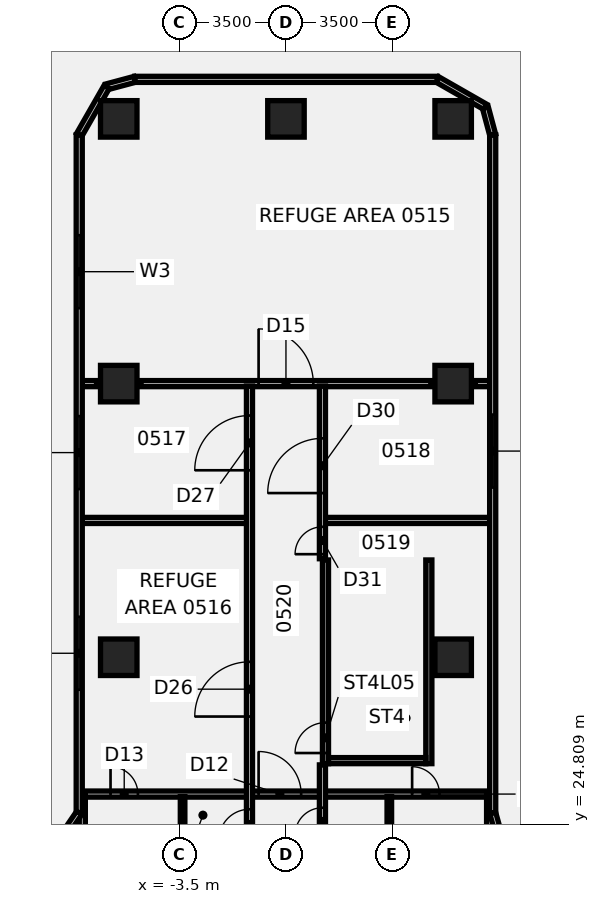
"""IFC4 building model, lengths in metres.
Left out: names, types, materials, properties, quantities, classifications, styles, units other than length and angle.
Written with IfcOpenShell. Run it as: python <this file> out.ifc"""

import sys

from ifc_helpers import new_model, si_unit, direction, frame, frame_2d, origin, origin_2d, place, context, subcontext, project, spatial, polyline, rectangle, outline, extrude, element, fill, save


model = new_model("IFC4")
c1 = context("Model", 3, precision=1e-05, world=origin(), true_north=direction((0.0, 1.0)))
c2 = subcontext(c1, "Body", "Model", "MODEL_VIEW")
j1 = project(units=[si_unit("LENGTHUNIT", "METRE"), si_unit("PLANEANGLEUNIT", "RADIAN")], contexts=[c1])
p1 = place(None, origin())
s1 = spatial("IfcSite", under=j1, at=p1, CompositionType="ELEMENT")
p2 = place(p1, origin())
s2 = spatial("IfcBuilding", under=s1, at=p2, CompositionType="ELEMENT")
p3 = place(p2, frame((0.0, 0.0, 29.5)))
s3 = spatial("IfcBuildingStorey", under=s2, at=p3, CompositionType="ELEMENT", Elevation=29.5)
p4 = place(p3, frame((-5.5, 39.3, -0.6), z_axis=(0.0, 0.0, 1.0), x_axis=(1.0, 0.0, 0.0)))
e1 = element("IfcColumn", 1, at=p4, inside=s3, PredefinedType="COLUMN", context=c2, shape_type="SweptSolid", body=[
    extrude(rectangle(XDim=1.2, YDim=1.2, at=origin_2d()), origin(), (0.0, 0.0, 1.0), 4.926),
])
p5 = place(p3, frame((5.5, 39.3, -0.6), z_axis=(0.0, 0.0, 1.0), x_axis=(1.0, 0.0, 0.0)))
e2 = element("IfcColumn", 2, at=p5, inside=s3, PredefinedType="COLUMN", context=c2, shape_type="SweptSolid", body=[
    extrude(rectangle(XDim=1.2, YDim=1.2, at=origin_2d()), origin(), (0.0, 0.0, 1.0), 4.926),
])
for number, where, z_axis, x_axis in (
    (3, (-5.5, 30.3, -0.6), (0.0, 0.0, 1.0), (1.0, 0.0, 0.0)),
    (4, (5.5, 30.3, -0.6), (0.0, 0.0, 1.0), (1.0, 0.0, 0.0)),
):
    element("IfcColumn", number, at=place(p3, frame(where, z_axis=z_axis, x_axis=x_axis)), inside=s3, PredefinedType="COLUMN", context=c2, shape_type="SweptSolid", body=[
        extrude(rectangle(XDim=1.2, YDim=1.2, at=origin_2d()), origin(), (0.0, 0.0, 1.0), 4.939),
    ])
p6 = place(p3, frame((5.5, 48.008, -0.6), z_axis=(0.0, 0.0, 1.0), x_axis=(1.0, 0.0, 0.0)))
e5 = element("IfcColumn", 5, at=p6, inside=s3, PredefinedType="COLUMN", context=c2, shape_type="SweptSolid", body=[
    extrude(rectangle(XDim=1.2, YDim=1.2, at=origin_2d()), origin(), (0.0, 0.0, 1.0), 4.918),
])
p7 = place(p3, frame((0.0, 48.008, -0.6), z_axis=(0.0, 0.0, 1.0), x_axis=(1.0, 0.0, 0.0)))
e6 = element("IfcColumn", 6, at=p7, inside=s3, PredefinedType="COLUMN", context=c2, shape_type="SweptSolid", body=[
    extrude(rectangle(XDim=1.2, YDim=1.2, at=origin_2d()), origin(), (0.0, 0.0, 1.0), 4.917),
])
p8 = place(p3, frame((-5.5, 48.008, -0.6), z_axis=(0.0, 0.0, 1.0), x_axis=(1.0, 0.0, 0.0)))
e7 = element("IfcColumn", 7, at=p8, inside=s3, PredefinedType="COLUMN", context=c2, shape_type="SweptSolid", body=[
    extrude(rectangle(XDim=1.2, YDim=1.2, at=origin_2d()), origin(), (0.0, 0.0, 1.0), 4.909),
])
p9 = place(p3, frame((-6.619, 25.8, 0.0), z_axis=(0.0, 0.0, 1.0), x_axis=(1.0, 0.0, 0.0)))
e8 = element("IfcWall", 8, at=p9, inside=s3, PredefinedType="PARTITIONING", context=c2, shape_type="SweptSolid", body=[
    extrude(rectangle(XDim=13.238, YDim=0.2, at=frame_2d((6.619, 0.0))), origin(), (0.0, 0.0, 1.0), 3.76),
])
p10 = place(p9, frame((5.719, 0.0, 0.0)))
e9 = element("IfcOpeningElement", 9, at=p10, cuts=e8, PredefinedType="OPENING", context=c2, shape_type="SweptSolid", body=[
    extrude(rectangle(XDim=1.4, YDim=2.1, at=frame_2d((0.7, 1.05))), frame((0.0, 0.11, 0.0), z_axis=(0.0, -1.0, 0.0), x_axis=(1.0, 0.0, 0.0)), (0.0, 0.0, 1.0), 0.22),
])
p11 = place(p9, frame((0.849, 0.0, 0.0)))
e10 = element("IfcOpeningElement", 10, at=p11, cuts=e8, PredefinedType="OPENING", context=c2, shape_type="SweptSolid", body=[
    extrude(rectangle(XDim=0.9, YDim=2.1, at=frame_2d((0.45, 1.05))), frame((0.0, 0.11, 0.0), z_axis=(0.0, -1.0, 0.0), x_axis=(1.0, 0.0, 0.0)), (0.0, 0.0, 1.0), 0.22),
])
p12 = place(p9, frame((10.769, 0.0, 0.0)))
e11 = element("IfcOpeningElement", 11, at=p12, cuts=e8, PredefinedType="OPENING", context=c2, shape_type="SweptSolid", body=[
    extrude(rectangle(XDim=0.9, YDim=2.1, at=frame_2d((0.45, 1.05))), frame((0.0, 0.11, 0.0), z_axis=(0.0, -1.0, 0.0), x_axis=(1.0, 0.0, 0.0)), (0.0, 0.0, 1.0), 0.22),
])
for number, where, z_axis, x_axis in (
    (12, (-6.699, 34.8, 0.0), (0.0, 0.0, 1.0), (1.0, 0.0, 0.0)),
    (13, (1.285, 34.8, 0.0), (0.0, 0.0, 1.0), (1.0, 0.0, 0.0)),
):
    element("IfcWall", number, at=place(p3, frame(where, z_axis=z_axis, x_axis=x_axis)), inside=s3, PredefinedType="PARTITIONING", context=c2, shape_type="SweptSolid", body=[
        extrude(rectangle(XDim=5.414, YDim=0.2, at=frame_2d((2.707, 0.0))), origin(), (0.0, 0.0, 1.0), 3.76),
    ])
p13 = place(p3, frame((-6.699, 39.3, 0.0), z_axis=(0.0, 0.0, 1.0), x_axis=(1.0, 0.0, 0.0)))
e14 = element("IfcWall", 14, at=p13, inside=s3, PredefinedType="PARTITIONING", context=c2, shape_type="SweptSolid", body=[
    extrude(rectangle(XDim=0.469, YDim=0.2, at=frame_2d((0.234, 0.0))), origin(), (0.0, 0.0, 1.0), 3.76),
])
p14 = place(p3, frame((-4.77, 39.3, 0.0), z_axis=(0.0, 0.0, 1.0), x_axis=(1.0, 0.0, 0.0)))
e15 = element("IfcWall", 15, at=p14, inside=s3, PredefinedType="PARTITIONING", context=c2, shape_type="SweptSolid", body=[
    extrude(rectangle(XDim=9.54, YDim=0.2, at=frame_2d((4.77, 0.0))), origin(), (0.0, 0.0, 1.0), 3.76),
])
p15 = place(p14, frame((3.87, 0.0, 0.0)))
e16 = element("IfcOpeningElement", 16, at=p15, cuts=e15, PredefinedType="OPENING", context=c2, shape_type="SweptSolid", body=[
    extrude(rectangle(XDim=1.8, YDim=2.1, at=frame_2d((0.9, 1.05))), frame((0.0, 0.11, 0.0), z_axis=(0.0, -1.0, 0.0), x_axis=(1.0, 0.0, 0.0)), (0.0, 0.0, 1.0), 0.22),
])
p16 = place(p3, frame((6.23, 39.3, 0.0), z_axis=(0.0, 0.0, 1.0), x_axis=(1.0, 0.0, 0.0)))
e17 = element("IfcWall", 17, at=p16, inside=s3, PredefinedType="PARTITIONING", context=c2, shape_type="SweptSolid", body=[
    extrude(rectangle(XDim=0.469, YDim=0.2, at=frame_2d((0.234, 0.0))), origin(), (0.0, 0.0, 1.0), 3.76),
])
p17 = place(p3, frame((-3.4, 22.711, 0.0), z_axis=(0.0, 0.0, 1.0), x_axis=(0.0, 1.0, 0.0)))
e18 = element("IfcWall", 18, at=p17, inside=s3, PredefinedType="PARTITIONING", context=c2, shape_type="SweptSolid", body=[
    extrude(rectangle(XDim=3.004, YDim=0.15, at=frame_2d((1.502, 0.0))), origin(), (0.0, 0.0, 1.0), 3.76),
])
p18 = place(p3, frame((-1.2, 23.4, 0.0), z_axis=(0.0, 0.0, 1.0), x_axis=(0.0, 1.0, 0.0)))
e19 = element("IfcWall", 19, at=p18, inside=s3, PredefinedType="PARTITIONING", context=c2, shape_type="SweptSolid", body=[
    extrude(rectangle(XDim=15.82, YDim=0.2, at=frame_2d((7.91, 0.0))), origin(), (0.0, 0.0, 1.0), 3.76),
])
p19 = place(p18, frame((0.9, 0.0, 0.0)))
e20 = element("IfcOpeningElement", 20, at=p19, cuts=e19, PredefinedType="OPENING", context=c2, shape_type="SweptSolid", body=[
    extrude(rectangle(XDim=1.0, YDim=2.1, at=frame_2d((0.5, 1.05))), frame((0.0, 0.11, 0.0), z_axis=(0.0, -1.0, 0.0), x_axis=(1.0, 0.0, 0.0)), (0.0, 0.0, 1.0), 0.22),
])
p20 = place(p18, frame((4.95, 0.0, 0.0)))
e21 = element("IfcOpeningElement", 21, at=p20, cuts=e19, PredefinedType="OPENING", context=c2, shape_type="SweptSolid", body=[
    extrude(rectangle(XDim=1.8, YDim=2.1, at=frame_2d((0.9, 1.05))), frame((0.0, 0.11, 0.0), z_axis=(0.0, -1.0, 0.0), x_axis=(1.0, 0.0, 0.0)), (0.0, 0.0, 1.0), 0.22),
])
p21 = place(p18, frame((13.05, 0.0, 0.0)))
e22 = element("IfcOpeningElement", 22, at=p21, cuts=e19, PredefinedType="OPENING", context=c2, shape_type="SweptSolid", body=[
    extrude(rectangle(XDim=1.8, YDim=2.1, at=frame_2d((0.9, 1.05))), frame((0.0, 0.11, 0.0), z_axis=(0.0, -1.0, 0.0), x_axis=(1.0, 0.0, 0.0)), (0.0, 0.0, 1.0), 0.22),
])
p22 = place(p3, frame((1.2, 23.4, 0.0), z_axis=(0.0, 0.0, 1.0), x_axis=(0.0, 1.0, 0.0)))
e23 = element("IfcWall", 23, at=p22, inside=s3, PredefinedType="PARTITIONING", context=c2, shape_type="SweptSolid", body=[
    extrude(rectangle(XDim=3.36, YDim=0.2, at=frame_2d((1.68, 0.0))), origin(), (0.0, 0.0, 1.0), 3.76),
])
p23 = place(p22, frame((1.05, 0.0, 0.0)))
e24 = element("IfcOpeningElement", 24, at=p23, cuts=e23, PredefinedType="OPENING", context=c2, shape_type="SweptSolid", body=[
    extrude(rectangle(XDim=0.9, YDim=2.1, at=frame_2d((0.45, 1.05))), frame((0.0, 0.11, 0.0), z_axis=(0.0, -1.0, 0.0), x_axis=(1.0, 0.0, 0.0)), (0.0, 0.0, 1.0), 0.22),
])
p24 = place(p3, frame((1.2, 33.54, 0.0), z_axis=(0.0, 0.0, 1.0), x_axis=(0.0, 1.0, 0.0)))
e25 = element("IfcWall", 25, at=p24, inside=s3, PredefinedType="PARTITIONING", context=c2, shape_type="SweptSolid", body=[
    extrude(rectangle(XDim=5.68, YDim=0.2, at=frame_2d((2.84, 0.0))), origin(), (0.0, 0.0, 1.0), 3.76),
])
p25 = place(p24, frame((2.16, 0.0, 0.0)))
e26 = element("IfcOpeningElement", 26, at=p25, cuts=e25, PredefinedType="OPENING", context=c2, shape_type="SweptSolid", body=[
    extrude(rectangle(XDim=1.8, YDim=2.1, at=frame_2d((0.9, 1.05))), frame((0.0, 0.11, 0.0), z_axis=(0.0, -1.0, 0.0), x_axis=(1.0, 0.0, 0.0)), (0.0, 0.0, 1.0), 0.22),
])
p26 = place(p24, frame((0.15, 0.0, 0.0)))
e27 = element("IfcOpeningElement", 27, at=p26, cuts=e25, PredefinedType="OPENING", context=c2, shape_type="SweptSolid", body=[
    extrude(rectangle(XDim=0.9, YDim=2.1, at=frame_2d((0.45, 1.05))), frame((0.0, 0.11, 0.0), z_axis=(0.0, -1.0, 0.0), x_axis=(1.0, 0.0, 0.0)), (0.0, 0.0, 1.0), 0.22),
])
p27 = place(p3, frame((3.4, 22.711, 0.0), z_axis=(0.0, 0.0, 1.0), x_axis=(0.0, 1.0, 0.0)))
e28 = element("IfcWall", 28, at=p27, inside=s3, PredefinedType="PARTITIONING", context=c2, shape_type="SweptSolid", body=[
    extrude(rectangle(XDim=3.004, YDim=0.15, at=frame_2d((1.502, 0.0))), origin(), (0.0, 0.0, 1.0), 3.76),
])
for number, where, z_axis, x_axis in (
    (29, (-6.699, 25.8, 0.0), (0.0, 0.0, 1.0), (0.0, -1.0, 0.0)),
    (30, (6.699, 25.8, 0.0), (0.0, 0.0, 1.0), (0.0, -1.0, 0.0)),
):
    element("IfcWall", number, at=place(p3, frame(where, z_axis=z_axis, x_axis=x_axis)), inside=s3, PredefinedType="PARTITIONING", context=c2, shape_type="SweptSolid", body=[
        extrude(rectangle(XDim=3.42, YDim=0.2, at=frame_2d((1.71, 0.0))), origin(), (0.0, 0.0, 1.0), 3.76),
    ])
p28 = place(p3, frame((7.25, 23.569, 0.0), z_axis=(0.0, 0.0, 1.0), x_axis=(-0.268802114608, 0.963195423153, 0.0)))
e31 = element("IfcWall", 31, at=p28, inside=s3, PredefinedType="SOLIDWALL", context=c2, shape_type="SweptSolid", body=[
    extrude(rectangle(XDim=1.674, YDim=0.2, at=frame_2d((0.837, 0.0))), origin(), (0.0, 0.0, 1.0), 4.36),
])
p29 = place(p3, frame((6.8, 25.181, 0.0), z_axis=(0.0, 0.0, 1.0), x_axis=(0.0, 1.0, 0.0)))
e32 = element("IfcWall", 32, at=p29, inside=s3, PredefinedType="SOLIDWALL", context=c2, shape_type="SweptSolid", body=[
    extrude(rectangle(XDim=22.3, YDim=0.2, at=frame_2d((11.15, 0.0))), origin(), (0.0, 0.0, 1.0), 4.36),
])
p30 = place(p29, frame((10.7, 0.0, 1.4)))
e33 = element("IfcOpeningElement", 33, at=p30, cuts=e32, PredefinedType="OPENING", context=c2, shape_type="SweptSolid", body=[
    extrude(rectangle(XDim=2.4, YDim=2.1, at=frame_2d((1.2, 1.05))), frame((0.0, 0.11, 0.0), z_axis=(0.0, -1.0, 0.0), x_axis=(1.0, 0.0, 0.0)), (0.0, 0.0, 1.0), 0.22),
])
p31 = place(p3, frame((6.8, 47.481, 0.0), z_axis=(0.0, 0.0, 1.0), x_axis=(-0.258855296676, 0.96591611198, 0.0)))
e34 = element("IfcWall", 34, at=p31, inside=s3, PredefinedType="SOLIDWALL", context=c2, shape_type="SweptSolid", body=[
    extrude(rectangle(XDim=0.955, YDim=0.2, at=frame_2d((0.478, 0.0))), origin(), (0.0, 0.0, 1.0), 4.36),
])
p32 = place(p3, frame((6.553, 48.404, 0.0), z_axis=(0.0, 0.0, 1.0), x_axis=(-0.867953965836, 0.496644654848, 0.0)))
e35 = element("IfcWall", 35, at=p32, inside=s3, PredefinedType="SOLIDWALL", context=c2, shape_type="SweptSolid", body=[
    extrude(rectangle(XDim=1.819, YDim=0.2, at=frame_2d((0.91, 0.0))), origin(), (0.0, 0.0, 1.0), 4.36),
])
p33 = place(p3, frame((4.974, 49.308, 0.0), z_axis=(0.0, 0.0, 1.0), x_axis=(-1.0, 0.0, 0.0)))
e36 = element("IfcWall", 36, at=p33, inside=s3, PredefinedType="SOLIDWALL", context=c2, shape_type="SweptSolid", body=[
    extrude(rectangle(XDim=9.947, YDim=0.2, at=frame_2d((4.974, 0.0))), origin(), (0.0, 0.0, 1.0), 4.36),
])
p34 = place(p3, frame((-4.974, 49.308, 0.0), z_axis=(0.0, 0.0, 1.0), x_axis=(-0.96591611198, -0.258855296676, 0.0)))
e37 = element("IfcWall", 37, at=p34, inside=s3, PredefinedType="SOLIDWALL", context=c2, shape_type="SweptSolid", body=[
    extrude(rectangle(XDim=0.955, YDim=0.2, at=frame_2d((0.478, 0.0))), origin(), (0.0, 0.0, 1.0), 4.36),
])
p35 = place(p3, frame((-5.896, 49.06, 0.0), z_axis=(0.0, 0.0, 1.0), x_axis=(-0.496644654848, -0.867953965836, 0.0)))
e38 = element("IfcWall", 38, at=p35, inside=s3, PredefinedType="SOLIDWALL", context=c2, shape_type="SweptSolid", body=[
    extrude(rectangle(XDim=1.819, YDim=0.2, at=frame_2d((0.91, 0.0))), origin(), (0.0, 0.0, 1.0), 4.36),
])
p36 = place(p3, frame((-6.8, 47.481, 0.0), z_axis=(0.0, 0.0, 1.0), x_axis=(0.0, -1.0, 0.0)))
e39 = element("IfcWall", 39, at=p36, inside=s3, PredefinedType="SOLIDWALL", context=c2, shape_type="SweptSolid", body=[
    extrude(rectangle(XDim=22.3, YDim=0.2, at=frame_2d((11.15, 0.0))), origin(), (0.0, 0.0, 1.0), 4.36),
])
p37 = place(p36, frame((3.3, 0.0, 1.4)))
e40 = element("IfcOpeningElement", 40, at=p37, cuts=e39, PredefinedType="OPENING", context=c2, shape_type="SweptSolid", body=[
    extrude(rectangle(XDim=2.4, YDim=2.1, at=frame_2d((1.2, 1.05))), frame((0.0, 0.11, 0.0), z_axis=(0.0, -1.0, 0.0), x_axis=(1.0, 0.0, 0.0)), (0.0, 0.0, 1.0), 0.22),
])
p38 = place(p36, frame((15.85, 0.0, 1.4)))
e41 = element("IfcOpeningElement", 41, at=p38, cuts=e39, PredefinedType="OPENING", context=c2, shape_type="SweptSolid", body=[
    extrude(rectangle(XDim=2.4, YDim=2.1, at=frame_2d((1.2, 1.05))), frame((0.0, 0.11, 0.0), z_axis=(0.0, -1.0, 0.0), x_axis=(1.0, 0.0, 0.0)), (0.0, 0.0, 1.0), 0.22),
])
p39 = place(p36, frame((9.25, 0.0, 1.4)))
e42 = element("IfcOpeningElement", 42, at=p39, cuts=e39, PredefinedType="OPENING", context=c2, shape_type="SweptSolid", body=[
    extrude(rectangle(XDim=2.4, YDim=2.1, at=frame_2d((1.2, 1.05))), frame((0.0, 0.11, 0.0), z_axis=(0.0, -1.0, 0.0), x_axis=(1.0, 0.0, 0.0)), (0.0, 0.0, 1.0), 0.22),
])
p40 = place(p3, frame((-6.8, 25.181, 0.0), z_axis=(0.0, 0.0, 1.0), x_axis=(-0.564050059702, -0.825740594951, 0.0)))
e43 = element("IfcWall", 43, at=p40, inside=s3, PredefinedType="SOLIDWALL", context=c2, shape_type="SweptSolid", body=[
    extrude(rectangle(XDim=3.812, YDim=0.2, at=frame_2d((1.906, 0.0))), origin(), (0.0, 0.0, 1.0), 4.36),
])
p41 = place(p3, frame((1.3, 26.8, 0.0), z_axis=(0.0, 0.0, 1.0), x_axis=(0.0, 1.0, 0.0)))
e44 = element("IfcWall", 44, at=p41, inside=s3, PredefinedType="SHEAR", context=c2, shape_type="SweptSolid", body=[
    extrude(rectangle(XDim=6.7, YDim=0.2, at=frame_2d((3.35, 0.0))), origin(), (0.0, 0.0, 1.0), 3.76),
])
p42 = place(p41, frame((0.35, 0.0, 0.0)))
e45 = element("IfcOpeningElement", 45, at=p42, cuts=e44, PredefinedType="OPENING", context=c2, shape_type="SweptSolid", body=[
    extrude(rectangle(XDim=1.0, YDim=2.1, at=frame_2d((0.5, 1.05))), frame((0.0, 0.11, 0.0), z_axis=(0.0, -1.0, 0.0), x_axis=(1.0, 0.0, 0.0)), (0.0, 0.0, 1.0), 0.22),
])
p43 = place(p3, frame((4.7, 26.8, 0.0), z_axis=(0.0, 0.0, 1.0), x_axis=(0.0, 1.0, 0.0)))
e46 = element("IfcWall", 46, at=p43, inside=s3, PredefinedType="SHEAR", context=c2, shape_type="SweptSolid", body=[
    extrude(rectangle(XDim=6.7, YDim=0.2, at=frame_2d((3.35, 0.0))), origin(), (0.0, 0.0, 1.0), 3.76),
])
p44 = place(p3, frame((4.6, 26.9, 0.0), z_axis=(0.0, 0.0, 1.0), x_axis=(-1.0, 0.0, 0.0)))
e47 = element("IfcWall", 47, at=p44, inside=s3, PredefinedType="SHEAR", context=c2, shape_type="SweptSolid", body=[
    extrude(rectangle(XDim=3.2, YDim=0.2, at=frame_2d((1.6, 0.0))), origin(), (0.0, 0.0, 1.0), 3.76),
])
p45 = place(p3, origin())
e48 = element("IfcWall", 48, at=p45, inside=s3, PredefinedType="SHEAR", context=c2, shape_type="SweptSolid", body=[
    extrude(outline(polyline([(4.6, 33.3), (4.6, 33.5), (1.4, 33.5), (1.4, 33.3), (4.6, 33.3)])), origin(), (0.0, 0.0, 1.0), 3.76),
])
p46 = place(p10, frame((1.4, 0.0, 0.0), z_axis=(0.0, 0.0, 1.0), x_axis=(-1.0, 0.0, 0.0)))
e49 = element("IfcDoor", 49, at=p46, inside=s3, OperationType="DOUBLE_DOOR_SINGLE_SWING", PredefinedType="DOOR", context=c2, shape_type="SweptSolid", body=[
    extrude(rectangle(XDim=1.4, YDim=2.1, at=frame_2d((0.7, 1.05))), frame((0.0, 0.025, 0.0), z_axis=(0.0, -1.0, 0.0), x_axis=(1.0, 0.0, 0.0)), (0.0, 0.0, 1.0), 0.05),
])
fill(e9, e49)
p47 = place(p11, frame((0.9, 0.0, 0.0), z_axis=(0.0, 0.0, 1.0), x_axis=(-1.0, 0.0, 0.0)))
e50 = element("IfcDoor", 50, at=p47, inside=s3, OperationType="SINGLE_SWING_LEFT", PredefinedType="DOOR", context=c2, shape_type="SweptSolid", body=[
    extrude(rectangle(XDim=0.9, YDim=2.1, at=frame_2d((0.45, 1.05))), frame((0.0, 0.025, 0.0), z_axis=(0.0, -1.0, 0.0), x_axis=(1.0, 0.0, 0.0)), (0.0, 0.0, 1.0), 0.05),
])
fill(e10, e50)
p48 = place(p12, frame((0.9, 0.0, 0.0), z_axis=(0.0, 0.0, 1.0), x_axis=(-1.0, 0.0, 0.0)))
e51 = element("IfcDoor", 51, at=p48, inside=s3, OperationType="SINGLE_SWING_RIGHT", PredefinedType="DOOR", context=c2, shape_type="SweptSolid", body=[
    extrude(rectangle(XDim=0.9, YDim=2.1, at=frame_2d((0.45, 1.05))), frame((0.0, 0.025, 0.0), z_axis=(0.0, -1.0, 0.0), x_axis=(1.0, 0.0, 0.0)), (0.0, 0.0, 1.0), 0.05),
])
fill(e11, e51)
p49 = place(p15, origin())
e52 = element("IfcDoor", 52, at=p49, inside=s3, OperationType="DOUBLE_DOOR_SINGLE_SWING", PredefinedType="DOOR", context=c2, shape_type="SweptSolid", body=[
    extrude(rectangle(XDim=1.8, YDim=2.1, at=frame_2d((0.9, 1.05))), frame((0.0, 0.025, 0.0), z_axis=(0.0, -1.0, 0.0), x_axis=(1.0, 0.0, 0.0)), (0.0, 0.0, 1.0), 0.05),
])
fill(e16, e52)
p50 = place(p19, origin())
e53 = element("IfcDoor", 53, at=p50, inside=s3, OperationType="SINGLE_SWING_RIGHT", PredefinedType="DOOR", context=c2, shape_type="SweptSolid", body=[
    extrude(rectangle(XDim=1.0, YDim=2.1, at=frame_2d((0.5, 1.05))), frame((0.0, 0.025, 0.0), z_axis=(0.0, -1.0, 0.0), x_axis=(1.0, 0.0, 0.0)), (0.0, 0.0, 1.0), 0.05),
])
fill(e20, e53)
p51 = place(p20, origin())
e54 = element("IfcDoor", 54, at=p51, inside=s3, OperationType="DOUBLE_DOOR_SINGLE_SWING", PredefinedType="DOOR", context=c2, shape_type="SweptSolid", body=[
    extrude(rectangle(XDim=1.8, YDim=2.1, at=frame_2d((0.9, 1.05))), frame((0.0, 0.025, 0.0), z_axis=(0.0, -1.0, 0.0), x_axis=(1.0, 0.0, 0.0)), (0.0, 0.0, 1.0), 0.05),
])
fill(e21, e54)
p52 = place(p21, origin())
e55 = element("IfcDoor", 55, at=p52, inside=s3, OperationType="DOUBLE_DOOR_SINGLE_SWING", PredefinedType="DOOR", context=c2, shape_type="SweptSolid", body=[
    extrude(rectangle(XDim=1.8, YDim=2.1, at=frame_2d((0.9, 1.05))), frame((0.0, 0.025, 0.0), z_axis=(0.0, -1.0, 0.0), x_axis=(1.0, 0.0, 0.0)), (0.0, 0.0, 1.0), 0.05),
])
fill(e22, e55)
p53 = place(p23, frame((0.9, 0.0, 0.0), z_axis=(0.0, 0.0, 1.0), x_axis=(-1.0, 0.0, 0.0)))
e56 = element("IfcDoor", 56, at=p53, inside=s3, OperationType="SINGLE_SWING_LEFT", PredefinedType="DOOR", context=c2, shape_type="SweptSolid", body=[
    extrude(rectangle(XDim=0.9, YDim=2.1, at=frame_2d((0.45, 1.05))), frame((0.0, 0.025, 0.0), z_axis=(0.0, -1.0, 0.0), x_axis=(1.0, 0.0, 0.0)), (0.0, 0.0, 1.0), 0.05),
])
fill(e24, e56)
p54 = place(p25, frame((1.8, 0.0, 0.0), z_axis=(0.0, 0.0, 1.0), x_axis=(-1.0, 0.0, 0.0)))
e57 = element("IfcDoor", 57, at=p54, inside=s3, OperationType="DOUBLE_DOOR_SINGLE_SWING", PredefinedType="DOOR", context=c2, shape_type="SweptSolid", body=[
    extrude(rectangle(XDim=1.8, YDim=2.1, at=frame_2d((0.9, 1.05))), frame((0.0, 0.025, 0.0), z_axis=(0.0, -1.0, 0.0), x_axis=(1.0, 0.0, 0.0)), (0.0, 0.0, 1.0), 0.05),
])
fill(e26, e57)
p55 = place(p26, frame((0.9, 0.0, 0.0), z_axis=(0.0, 0.0, 1.0), x_axis=(-1.0, 0.0, 0.0)))
e58 = element("IfcDoor", 58, at=p55, inside=s3, OperationType="SINGLE_SWING_LEFT", PredefinedType="DOOR", context=c2, shape_type="SweptSolid", body=[
    extrude(rectangle(XDim=0.9, YDim=2.1, at=frame_2d((0.45, 1.05))), frame((0.0, 0.025, 0.0), z_axis=(0.0, -1.0, 0.0), x_axis=(1.0, 0.0, 0.0)), (0.0, 0.0, 1.0), 0.05),
])
fill(e27, e58)
p56 = place(p37, origin())
e59 = element("IfcWindow", 59, at=p56, inside=s3, PartitioningType="SINGLE_PANEL", PredefinedType="WINDOW", context=c2, shape_type="SweptSolid", body=[
    extrude(rectangle(XDim=2.4, YDim=2.1, at=frame_2d((1.2, 1.05))), frame((0.0, 0.03, 0.0), z_axis=(0.0, -1.0, 0.0), x_axis=(1.0, 0.0, 0.0)), (0.0, 0.0, 1.0), 0.06),
])
fill(e40, e59)
p57 = place(p38, origin())
e60 = element("IfcWindow", 60, at=p57, inside=s3, PartitioningType="SINGLE_PANEL", PredefinedType="WINDOW", context=c2, shape_type="SweptSolid", body=[
    extrude(rectangle(XDim=2.4, YDim=2.1, at=frame_2d((1.2, 1.05))), frame((0.0, 0.03, 0.0), z_axis=(0.0, -1.0, 0.0), x_axis=(1.0, 0.0, 0.0)), (0.0, 0.0, 1.0), 0.06),
])
fill(e41, e60)
p58 = place(p39, origin())
e61 = element("IfcWindow", 61, at=p58, inside=s3, PartitioningType="SINGLE_PANEL", PredefinedType="WINDOW", context=c2, shape_type="SweptSolid", body=[
    extrude(rectangle(XDim=2.4, YDim=2.1, at=frame_2d((1.2, 1.05))), frame((0.0, 0.03, 0.0), z_axis=(0.0, -1.0, 0.0), x_axis=(1.0, 0.0, 0.0)), (0.0, 0.0, 1.0), 0.06),
])
fill(e42, e61)
p59 = place(p30, origin())
e62 = element("IfcWindow", 62, at=p59, inside=s3, PartitioningType="SINGLE_PANEL", PredefinedType="WINDOW", context=c2, shape_type="SweptSolid", body=[
    extrude(rectangle(XDim=2.4, YDim=2.1, at=frame_2d((1.2, 1.05))), frame((0.0, 0.03, 0.0), z_axis=(0.0, -1.0, 0.0), x_axis=(1.0, 0.0, 0.0)), (0.0, 0.0, 1.0), 0.06),
])
fill(e33, e62)
p60 = place(p42, origin())
e63 = element("IfcDoor", 63, at=p60, inside=s3, OperationType="SINGLE_SWING_LEFT", PredefinedType="DOOR", context=c2, shape_type="SweptSolid", body=[
    extrude(rectangle(XDim=1.0, YDim=2.1, at=frame_2d((0.5, 1.05))), frame((0.0, 0.025, 0.0), z_axis=(0.0, -1.0, 0.0), x_axis=(1.0, 0.0, 0.0)), (0.0, 0.0, 1.0), 0.05),
])
fill(e45, e63)
save(model, sys.argv[1])
